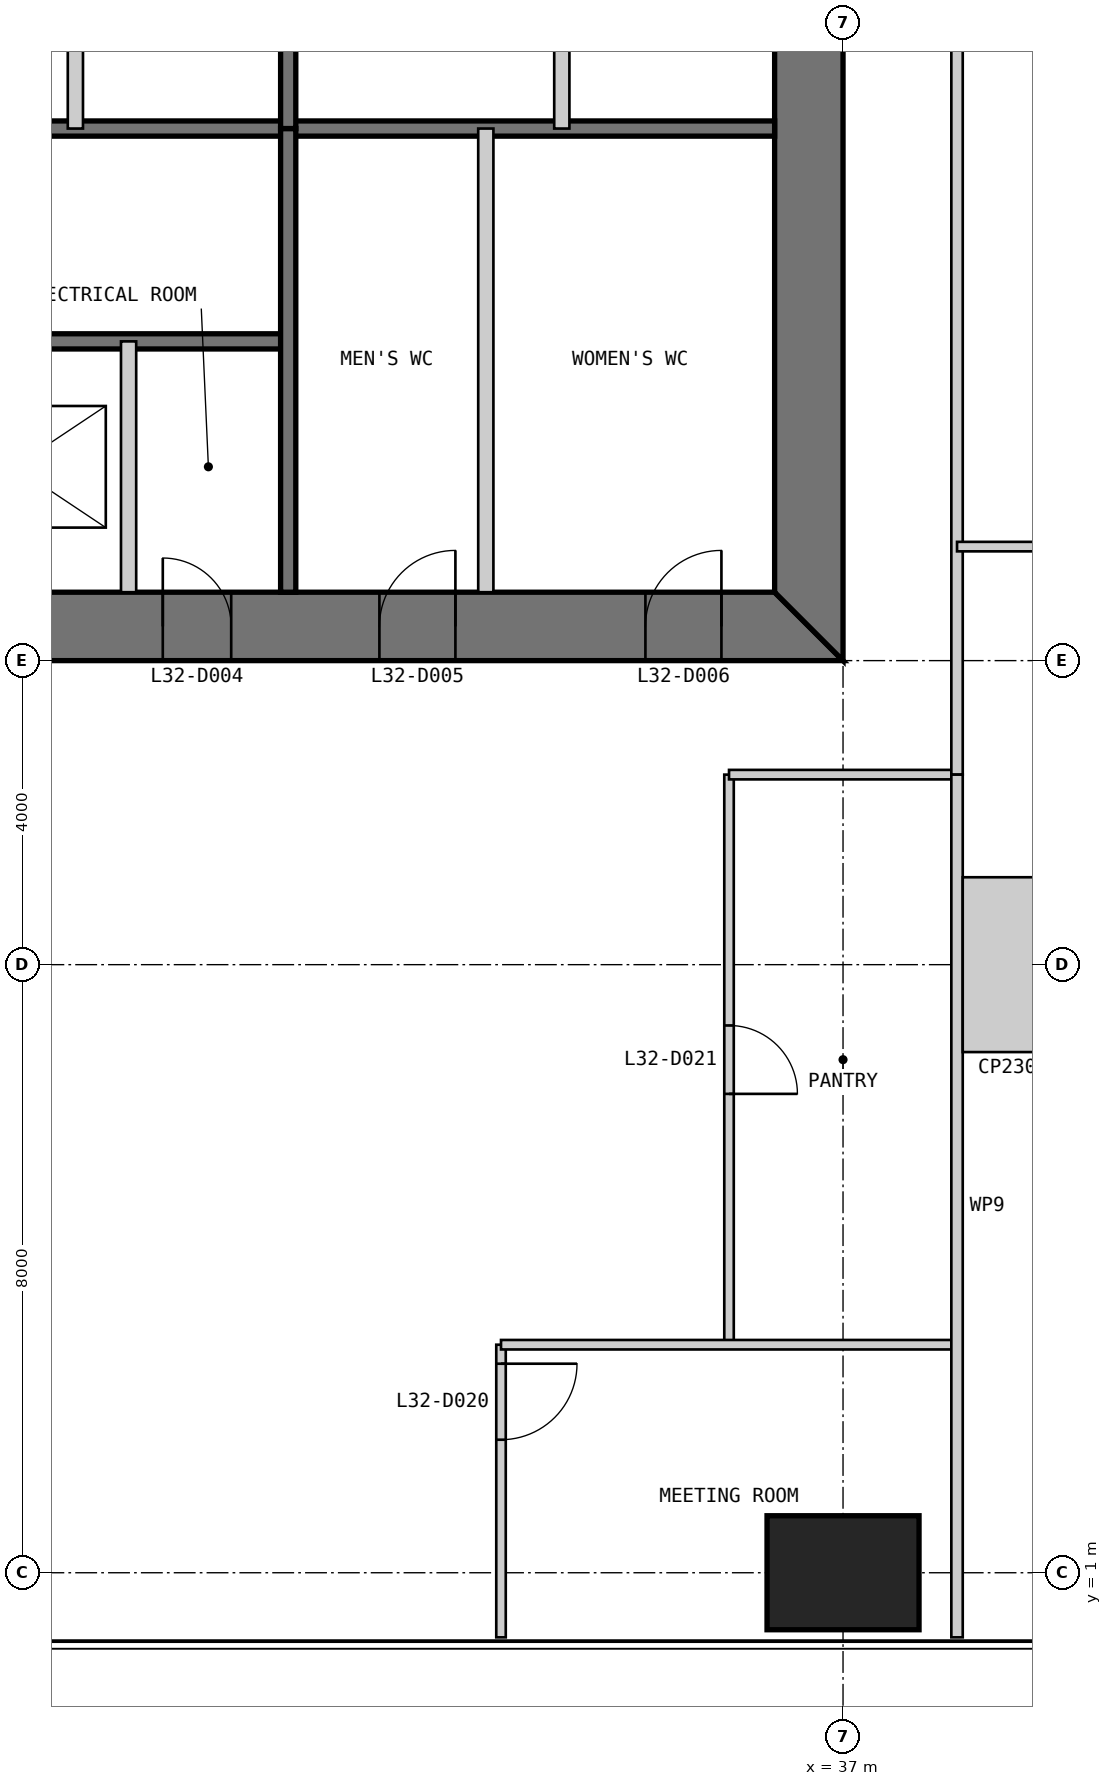
"""IFC4 building model, lengths in metres.
Left out: names, types, materials, properties, quantities, classifications, styles, units other than length and angle.
Written with IfcOpenShell. Run it as: python <this file> out.ifc"""

import sys

from ifc_helpers import new_model, si_unit, direction, frame, frame_2d, origin, origin_2d, place, context, subcontext, project, spatial, polyline, rectangle, outline, extrude, element, fill, save


model = new_model("IFC4")
c1 = context("Model", 3, precision=1e-05, world=origin(), true_north=direction((0.0, 1.0)))
c2 = subcontext(c1, "Body", "Model", "MODEL_VIEW")
j1 = project(units=[si_unit("LENGTHUNIT", "METRE"), si_unit("PLANEANGLEUNIT", "RADIAN")], contexts=[c1])
p1 = place(None, origin())
s1 = spatial("IfcSite", under=j1, at=p1, CompositionType="ELEMENT")
p2 = place(p1, origin())
s2 = spatial("IfcBuilding", under=s1, at=p2, CompositionType="ELEMENT")
p3 = place(p2, frame((0.0, 0.0, 138.4)))
s3 = spatial("IfcBuildingStorey", under=s2, at=p3, CompositionType="ELEMENT", Elevation=138.4)
p4 = place(p3, frame((37.0, 1.0, 0.0), z_axis=(0.0, 0.0, 1.0), x_axis=(1.0, 0.0, 0.0)))
e1 = element("IfcColumn", 1, at=p4, inside=s3, PredefinedType="COLUMN", context=c2, shape_type="SweptSolid", body=[
    extrude(rectangle(XDim=2.0, YDim=1.5, at=origin_2d()), origin(), (0.0, 0.0, 1.0), 4.0),
])
p5 = place(p3, frame((13.0, 13.45, 0.0), z_axis=(0.0, 0.0, 1.0), x_axis=(1.0, 0.0, 0.0)))
e2 = element("IfcWall", 2, at=p5, inside=s3, PredefinedType="SHEAR", context=c2, shape_type="SweptSolid", body=[
    extrude(outline(polyline([(0.0, -0.45), (24.0, -0.45), (23.1, 0.45), (0.9, 0.45), (0.0, -0.45)])), origin(), (0.0, 0.0, 1.0), 4.0),
])
p6 = place(p5, frame((4.9, 0.0, 0.0)))
e3 = element("IfcOpeningElement", 3, at=p6, cuts=e2, PredefinedType="OPENING", context=c2, shape_type="SweptSolid", body=[
    extrude(rectangle(XDim=1.0, YDim=2.2, at=frame_2d((0.5, 1.1))), frame((0.0, 0.46, 0.0), z_axis=(0.0, -1.0, 0.0), x_axis=(1.0, 0.0, 0.0)), (0.0, 0.0, 1.0), 0.92),
])
p7 = place(p5, frame((8.9, 0.0, 0.0)))
e4 = element("IfcOpeningElement", 4, at=p7, cuts=e2, PredefinedType="OPENING", context=c2, shape_type="SweptSolid", body=[
    extrude(rectangle(XDim=1.1, YDim=2.2, at=frame_2d((0.55, 1.1))), frame((0.0, 0.46, 0.0), z_axis=(0.0, -1.0, 0.0), x_axis=(1.0, 0.0, 0.0)), (0.0, 0.0, 1.0), 0.92),
])
p8 = place(p5, frame((15.05, 0.0, 0.0)))
e5 = element("IfcOpeningElement", 5, at=p8, cuts=e2, PredefinedType="OPENING", context=c2, shape_type="SweptSolid", body=[
    extrude(rectangle(XDim=0.9, YDim=2.2, at=frame_2d((0.45, 1.1))), frame((0.0, 0.46, 0.0), z_axis=(0.0, -1.0, 0.0), x_axis=(1.0, 0.0, 0.0)), (0.0, 0.0, 1.0), 0.92),
])
p9 = place(p5, frame((17.9, 0.0, 0.0)))
e6 = element("IfcOpeningElement", 6, at=p9, cuts=e2, PredefinedType="OPENING", context=c2, shape_type="SweptSolid", body=[
    extrude(rectangle(XDim=1.0, YDim=2.2, at=frame_2d((0.5, 1.1))), frame((0.0, 0.46, 0.0), z_axis=(0.0, -1.0, 0.0), x_axis=(1.0, 0.0, 0.0)), (0.0, 0.0, 1.0), 0.92),
])
p10 = place(p5, frame((21.4, 0.0, 0.0)))
e7 = element("IfcOpeningElement", 7, at=p10, cuts=e2, PredefinedType="OPENING", context=c2, shape_type="SweptSolid", body=[
    extrude(rectangle(XDim=1.0, YDim=2.2, at=frame_2d((0.5, 1.1))), frame((0.0, 0.46, 0.0), z_axis=(0.0, -1.0, 0.0), x_axis=(1.0, 0.0, 0.0)), (0.0, 0.0, 1.0), 0.92),
])
p11 = place(p3, frame((36.55, 13.9, 0.0), z_axis=(0.0, 0.0, 1.0), x_axis=(0.0, 1.0, 0.0)))
e8 = element("IfcWall", 8, at=p11, inside=s3, PredefinedType="SHEAR", context=c2, shape_type="SweptSolid", body=[
    extrude(outline(polyline([(-0.9, -0.45), (23.1, -0.45), (22.2, 0.45), (0.0, 0.45), (-0.9, -0.45)])), origin(), (0.0, 0.0, 1.0), 4.0),
])
p12 = place(p11, frame((20.2, 0.0, 0.0)))
e9 = element("IfcOpeningElement", 9, at=p12, cuts=e8, PredefinedType="OPENING", context=c2, shape_type="SweptSolid", body=[
    extrude(rectangle(XDim=1.0, YDim=2.2, at=frame_2d((0.5, 1.1))), frame((0.0, 0.46, 0.0), z_axis=(0.0, -1.0, 0.0), x_axis=(1.0, 0.0, 0.0)), (0.0, 0.0, 1.0), 0.92),
])
p13 = place(p11, frame((17.25, 0.0, 0.0)))
e10 = element("IfcOpeningElement", 10, at=p13, cuts=e8, PredefinedType="OPENING", context=c2, shape_type="SweptSolid", body=[
    extrude(rectangle(XDim=0.9, YDim=2.2, at=frame_2d((0.45, 1.1))), frame((0.0, 0.46, 0.0), z_axis=(0.0, -1.0, 0.0), x_axis=(1.0, 0.0, 0.0)), (0.0, 0.0, 1.0), 0.92),
])
p14 = place(p3, frame((20.3, 17.2, 0.0), z_axis=(0.0, 0.0, 1.0), x_axis=(1.0, 0.0, 0.0)))
e11 = element("IfcWall", 11, at=p14, inside=s3, PredefinedType="SOLIDWALL", context=c2, shape_type="SweptSolid", body=[
    extrude(rectangle(XDim=9.4, YDim=0.2, at=frame_2d((4.7, 0.0))), origin(), (0.0, 0.0, 1.0), 3.8),
])
p15 = place(p14, frame((0.25, 0.0, 0.0)))
e12 = element("IfcOpeningElement", 12, at=p15, cuts=e11, PredefinedType="OPENING", context=c2, shape_type="SweptSolid", body=[
    extrude(rectangle(XDim=1.0, YDim=2.2, at=frame_2d((0.5, 1.1))), frame((0.0, 0.11, 0.0), z_axis=(0.0, -1.0, 0.0), x_axis=(1.0, 0.0, 0.0)), (0.0, 0.0, 1.0), 0.22),
])
p16 = place(p3, frame((20.3, 20.0, 0.0), z_axis=(0.0, 0.0, 1.0), x_axis=(1.0, 0.0, 0.0)))
e13 = element("IfcWall", 13, at=p16, inside=s3, PredefinedType="SOLIDWALL", context=c2, shape_type="SweptSolid", body=[
    extrude(rectangle(XDim=15.8, YDim=0.2, at=frame_2d((7.9, 0.0))), origin(), (0.0, 0.0, 1.0), 3.8),
])
p17 = place(p3, frame((27.6, 13.9, 0.0), z_axis=(0.0, 0.0, 1.0), x_axis=(0.0, 1.0, 0.0)))
e14 = element("IfcWall", 14, at=p17, inside=s3, PredefinedType="PARTITIONING", context=c2, shape_type="SweptSolid", body=[
    extrude(rectangle(XDim=3.3, YDim=0.2, at=frame_2d((1.65, 0.0))), origin(), (0.0, 0.0, 1.0), 3.8),
])
p18 = place(p3, frame((29.7, 13.9, 0.0), z_axis=(0.0, 0.0, 1.0), x_axis=(0.0, 1.0, 0.0)))
e15 = element("IfcWall", 15, at=p18, inside=s3, PredefinedType="SOLIDWALL", context=c2, shape_type="SweptSolid", body=[
    extrude(rectangle(XDim=6.1, YDim=0.2, at=frame_2d((3.05, 0.0))), origin(), (0.0, 0.0, 1.0), 3.8),
])
p19 = place(p3, frame((32.3, 13.9, 0.0), z_axis=(0.0, 0.0, 1.0), x_axis=(0.0, 1.0, 0.0)))
e16 = element("IfcWall", 16, at=p19, inside=s3, PredefinedType="PARTITIONING", context=c2, shape_type="SweptSolid", body=[
    extrude(rectangle(XDim=6.1, YDim=0.2, at=frame_2d((3.05, 0.0))), origin(), (0.0, 0.0, 1.0), 3.8),
])
p20 = place(p3, frame((33.3, 36.1, 0.0), z_axis=(0.0, 0.0, 1.0), x_axis=(0.0, -1.0, 0.0)))
e17 = element("IfcWall", 17, at=p20, inside=s3, PredefinedType="PARTITIONING", context=c2, shape_type="SweptSolid", body=[
    extrude(rectangle(XDim=16.1, YDim=0.2, at=frame_2d((8.05, 0.0))), origin(), (0.0, 0.0, 1.0), 3.8),
])
p21 = place(p20, frame((4.4, 0.0, 0.0)))
e18 = element("IfcOpeningElement", 18, at=p21, cuts=e17, PredefinedType="OPENING", context=c2, shape_type="SweptSolid", body=[
    extrude(rectangle(XDim=0.9, YDim=2.2, at=frame_2d((0.45, 1.1))), frame((0.0, 0.11, 0.0), z_axis=(0.0, -1.0, 0.0), x_axis=(1.0, 0.0, 0.0)), (0.0, 0.0, 1.0), 0.22),
])
p22 = place(p3, frame((29.7, 36.1, 0.0), z_axis=(0.0, 0.0, 1.0), x_axis=(0.0, -1.0, 0.0)))
e19 = element("IfcWall", 19, at=p22, inside=s3, PredefinedType="SOLIDWALL", context=c2, shape_type="SweptSolid", body=[
    extrude(rectangle(XDim=16.1, YDim=0.2, at=frame_2d((8.05, 0.0))), origin(), (0.0, 0.0, 1.0), 3.8),
])
p23 = place(p3, frame((26.9, 30.0, 0.0), z_axis=(0.0, 0.0, 1.0), x_axis=(0.0, -1.0, 0.0)))
e20 = element("IfcWall", 20, at=p23, inside=s3, PredefinedType="PARTITIONING", context=c2, shape_type="SweptSolid", body=[
    extrude(rectangle(XDim=10.0, YDim=0.2, at=frame_2d((5.0, 0.0))), origin(), (0.0, 0.0, 1.0), 3.8),
])
p24 = place(p3, frame((32.5, 0.15, 0.0), z_axis=(0.0, 0.0, 1.0), x_axis=(0.0, 1.0, 0.0)))
e21 = element("IfcWall", 21, at=p24, inside=s3, PredefinedType="PARTITIONING", context=c2, shape_type="SweptSolid", body=[
    extrude(rectangle(XDim=3.85, YDim=0.125, at=frame_2d((1.925, 0.0))), origin(), (0.0, 0.0, 1.0), 3.85),
])
p25 = place(p24, frame((2.6, 0.0, 0.0)))
e22 = element("IfcOpeningElement", 22, at=p25, cuts=e21, PredefinedType="OPENING", context=c2, shape_type="SweptSolid", body=[
    extrude(rectangle(XDim=1.0, YDim=2.2, at=frame_2d((0.5, 1.1))), frame((0.0, 0.073, 0.0), z_axis=(0.0, -1.0, 0.0), x_axis=(1.0, 0.0, 0.0)), (0.0, 0.0, 1.0), 0.145),
])
p26 = place(p3, frame((35.5, 4.0, 0.0), z_axis=(0.0, 0.0, 1.0), x_axis=(0.0, 1.0, 0.0)))
e23 = element("IfcWall", 23, at=p26, inside=s3, PredefinedType="PARTITIONING", context=c2, shape_type="SweptSolid", body=[
    extrude(rectangle(XDim=7.5, YDim=0.125, at=frame_2d((3.75, 0.0))), origin(), (0.0, 0.0, 1.0), 3.85),
])
p27 = place(p26, frame((3.3, 0.0, 0.0)))
e24 = element("IfcOpeningElement", 24, at=p27, cuts=e23, PredefinedType="OPENING", context=c2, shape_type="SweptSolid", body=[
    extrude(rectangle(XDim=0.9, YDim=2.2, at=frame_2d((0.45, 1.1))), frame((0.0, 0.073, 0.0), z_axis=(0.0, -1.0, 0.0), x_axis=(1.0, 0.0, 0.0)), (0.0, 0.0, 1.0), 0.145),
])
p28 = place(p3, frame((32.5, 4.0, 0.0), z_axis=(0.0, 0.0, 1.0), x_axis=(1.0, 0.0, 0.0)))
e25 = element("IfcWall", 25, at=p28, inside=s3, PredefinedType="PARTITIONING", context=c2, shape_type="SweptSolid", body=[
    extrude(rectangle(XDim=6.0, YDim=0.125, at=frame_2d((3.0, 0.0))), origin(), (0.0, 0.0, 1.0), 3.85),
])
p29 = place(p3, frame((35.5, 11.5, 0.0), z_axis=(0.0, 0.0, 1.0), x_axis=(1.0, 0.0, 0.0)))
e26 = element("IfcWall", 26, at=p29, inside=s3, PredefinedType="PARTITIONING", context=c2, shape_type="SweptSolid", body=[
    extrude(rectangle(XDim=3.0, YDim=0.125, at=frame_2d((1.5, 0.0))), origin(), (0.0, 0.0, 1.0), 3.85),
])
p30 = place(p3, frame((38.5, 11.5, 0.0), z_axis=(0.0, 0.0, 1.0), x_axis=(0.0, 1.0, 0.0)))
e27 = element("IfcWall", 27, at=p30, inside=s3, PredefinedType="PARTITIONING", context=c2, shape_type="SweptSolid", body=[
    extrude(rectangle(XDim=27.0, YDim=0.15, at=frame_2d((13.5, 0.0))), origin(), (0.0, 0.0, 1.0), 3.85),
])
p31 = place(p30, frame((13.0, 0.0, 0.0)))
e28 = element("IfcOpeningElement", 28, at=p31, cuts=e27, PredefinedType="OPENING", context=c2, shape_type="SweptSolid", body=[
    extrude(rectangle(XDim=1.0, YDim=2.2, at=frame_2d((0.5, 1.1))), frame((0.0, 0.085, 0.0), z_axis=(0.0, -1.0, 0.0), x_axis=(1.0, 0.0, 0.0)), (0.0, 0.0, 1.0), 0.17),
])
p32 = place(p3, frame((38.5, 0.15, 0.0), z_axis=(0.0, 0.0, 1.0), x_axis=(0.0, 1.0, 0.0)))
e29 = element("IfcWall", 29, at=p32, inside=s3, PredefinedType="PARTITIONING", context=c2, shape_type="SweptSolid", body=[
    extrude(rectangle(XDim=11.35, YDim=0.15, at=frame_2d((5.675, 0.0))), origin(), (0.0, 0.0, 1.0), 3.85),
])
p33 = place(p3, frame((49.85, 14.5, 0.0), z_axis=(0.0, 0.0, 1.0), x_axis=(-1.0, 0.0, 0.0)))
e30 = element("IfcWall", 30, at=p33, inside=s3, PredefinedType="PARTITIONING", context=c2, shape_type="SweptSolid", body=[
    extrude(rectangle(XDim=11.35, YDim=0.125, at=frame_2d((5.675, 0.0))), origin(), (0.0, 0.0, 1.0), 3.85),
])
p34 = place(p33, frame((7.15, 0.0, 0.0)))
e31 = element("IfcOpeningElement", 31, at=p34, cuts=e30, PredefinedType="OPENING", context=c2, shape_type="SweptSolid", body=[
    extrude(rectangle(XDim=0.9, YDim=2.2, at=frame_2d((0.45, 1.1))), frame((0.0, 0.073, 0.0), z_axis=(0.0, -1.0, 0.0), x_axis=(1.0, 0.0, 0.0)), (0.0, 0.0, 1.0), 0.145),
])
p35 = place(p3, frame((38.575, 9.0, 0.0), z_axis=(0.0, 0.0, 1.0), x_axis=(1.0, 0.0, 0.0)))
e32 = element("IfcWall", 32, at=p35, inside=s3, PredefinedType="PARTITIONING", context=c2, shape_type="SweptSolid", body=[
    extrude(rectangle(XDim=1.325, YDim=2.3, at=frame_2d((0.663, 0.0))), origin(), (0.0, 0.0, 1.0), 3.85),
])
p36 = place(p8, origin())
e33 = element("IfcDoor", 33, at=p36, inside=s3, OperationType="SINGLE_SWING_LEFT", PredefinedType="DOOR", context=c2, shape_type="SweptSolid", body=[
    extrude(rectangle(XDim=0.9, YDim=2.2, at=frame_2d((0.45, 1.1))), frame((0.0, 0.025, 0.0), z_axis=(0.0, -1.0, 0.0), x_axis=(1.0, 0.0, 0.0)), (0.0, 0.0, 1.0), 0.05),
    extrude(outline(polyline([(0.0, 0.0), (0.04, 0.0), (0.04, 2.16), (0.86, 2.16), (0.86, 0.0), (0.9, 0.0), (0.9, 2.2), (0.0, 2.2), (0.0, 0.0)])), frame((0.0, 0.3, 0.0), z_axis=(0.0, -1.0, 0.0), x_axis=(1.0, 0.0, 0.0)), (0.0, 0.0, 1.0), 0.6),
])
fill(e5, e33)
p37 = place(p9, origin())
e34 = element("IfcDoor", 34, at=p37, inside=s3, OperationType="SINGLE_SWING_RIGHT", PredefinedType="DOOR", context=c2, shape_type="SweptSolid", body=[
    extrude(rectangle(XDim=1.0, YDim=2.2, at=frame_2d((0.5, 1.1))), frame((0.0, 0.025, 0.0), z_axis=(0.0, -1.0, 0.0), x_axis=(1.0, 0.0, 0.0)), (0.0, 0.0, 1.0), 0.05),
    extrude(outline(polyline([(0.0, 0.0), (0.04, 0.0), (0.04, 2.16), (0.96, 2.16), (0.96, 0.0), (1.0, 0.0), (1.0, 2.2), (0.0, 2.2), (0.0, 0.0)])), frame((0.0, 0.3, 0.0), z_axis=(0.0, -1.0, 0.0), x_axis=(1.0, 0.0, 0.0)), (0.0, 0.0, 1.0), 0.6),
])
fill(e6, e34)
p38 = place(p10, origin())
e35 = element("IfcDoor", 35, at=p38, inside=s3, OperationType="SINGLE_SWING_RIGHT", PredefinedType="DOOR", context=c2, shape_type="SweptSolid", body=[
    extrude(rectangle(XDim=1.0, YDim=2.2, at=frame_2d((0.5, 1.1))), frame((0.0, 0.025, 0.0), z_axis=(0.0, -1.0, 0.0), x_axis=(1.0, 0.0, 0.0)), (0.0, 0.0, 1.0), 0.05),
    extrude(outline(polyline([(0.0, 0.0), (0.04, 0.0), (0.04, 2.16), (0.96, 2.16), (0.96, 0.0), (1.0, 0.0), (1.0, 2.2), (0.0, 2.2), (0.0, 0.0)])), frame((0.0, 0.3, 0.0), z_axis=(0.0, -1.0, 0.0), x_axis=(1.0, 0.0, 0.0)), (0.0, 0.0, 1.0), 0.6),
])
fill(e7, e35)
p39 = place(p25, frame((1.0, 0.0, 0.0), z_axis=(0.0, 0.0, 1.0), x_axis=(-1.0, 0.0, 0.0)))
e36 = element("IfcDoor", 36, at=p39, inside=s3, OperationType="SINGLE_SWING_LEFT", PredefinedType="DOOR", context=c2, shape_type="SweptSolid", body=[
    extrude(rectangle(XDim=1.0, YDim=2.2, at=frame_2d((0.5, 1.1))), frame((0.0, 0.025, 0.0), z_axis=(0.0, -1.0, 0.0), x_axis=(1.0, 0.0, 0.0)), (0.0, 0.0, 1.0), 0.05),
])
fill(e22, e36)
p40 = place(p27, frame((0.9, 0.0, 0.0), z_axis=(0.0, 0.0, 1.0), x_axis=(-1.0, 0.0, 0.0)))
e37 = element("IfcDoor", 37, at=p40, inside=s3, OperationType="SINGLE_SWING_RIGHT", PredefinedType="DOOR", context=c2, shape_type="SweptSolid", body=[
    extrude(rectangle(XDim=0.9, YDim=2.2, at=frame_2d((0.45, 1.1))), frame((0.0, 0.025, 0.0), z_axis=(0.0, -1.0, 0.0), x_axis=(1.0, 0.0, 0.0)), (0.0, 0.0, 1.0), 0.05),
])
fill(e24, e37)
save(model, sys.argv[1])
